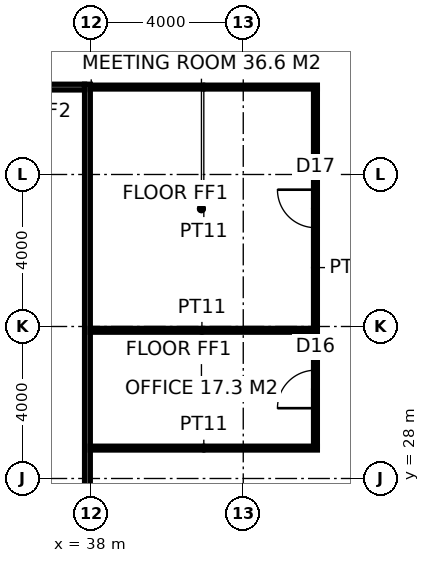
"""IFC4 building model, lengths in metres.
Left out: names, types, materials, properties, quantities, classifications, styles, units other than length and angle.
Written with IfcOpenShell. Run it as: python <this file> out.ifc"""

import sys

from ifc_helpers import new_model, si_unit, direction, frame, frame_2d, origin, place, context, subcontext, project, spatial, rectangle, extrude, element, fill, save


model = new_model("IFC4")
c1 = context("Model", 3, precision=1e-05, world=origin(), true_north=direction((0.0, 1.0)))
c2 = subcontext(c1, "Body", "Model", "MODEL_VIEW")
j1 = project(units=[si_unit("LENGTHUNIT", "METRE"), si_unit("PLANEANGLEUNIT", "RADIAN")], contexts=[c1])
p1 = place(None, origin())
s1 = spatial("IfcSite", under=j1, at=p1, CompositionType="ELEMENT")
p2 = place(p1, origin())
s2 = spatial("IfcBuilding", under=s1, at=p2, CompositionType="ELEMENT")
p3 = place(p2, frame((0.0, 0.0, 81.4)))
s3 = spatial("IfcBuildingStorey", under=s2, at=p3, CompositionType="ELEMENT", Elevation=81.4)
p4 = place(p3, frame((37.9, 15.025, 0.0), z_axis=(0.0, 0.0, 1.0), x_axis=(0.0, 1.0, 0.0)))
e1 = element("IfcWall", 1, at=p4, inside=s3, PredefinedType="PARTITIONING", context=c2, shape_type="SweptSolid", body=[
    extrude(rectangle(XDim=23.35, YDim=0.15, at=frame_2d((11.675, 0.0))), origin(), (0.0, 0.0, 1.0), 2.95),
])
p5 = place(p4, frame((10.775, 0.0, 0.0)))
e2 = element("IfcOpeningElement", 2, at=p5, cuts=e1, PredefinedType="OPENING", context=c2, shape_type="SweptSolid", body=[
    extrude(rectangle(XDim=1.8, YDim=2.4, at=frame_2d((0.9, 1.2))), frame((0.0, 0.085, 0.0), z_axis=(0.0, -1.0, 0.0), x_axis=(1.0, 0.0, 0.0)), (0.0, 0.0, 1.0), 0.17),
])
p6 = place(p3, frame((15.775, 38.3, 0.0), z_axis=(0.0, 0.0, 1.0), x_axis=(1.0, 0.0, 0.0)))
e3 = element("IfcWall", 3, at=p6, inside=s3, PredefinedType="PARTITIONING", context=c2, shape_type="SweptSolid", body=[
    extrude(rectangle(XDim=22.05, YDim=0.15, at=frame_2d((11.025, 0.0))), origin(), (0.0, 0.0, 1.0), 3.85),
])
p7 = place(p6, frame((7.975, 0.0, 0.0)))
e4 = element("IfcOpeningElement", 4, at=p7, cuts=e3, PredefinedType="OPENING", context=c2, shape_type="SweptSolid", body=[
    extrude(rectangle(XDim=0.9, YDim=2.1, at=frame_2d((0.45, 1.05))), frame((0.0, 0.085, 0.0), z_axis=(0.0, -1.0, 0.0), x_axis=(1.0, 0.0, 0.0)), (0.0, 0.0, 1.0), 0.17),
])
p8 = place(p6, frame((11.725, 0.0, 0.0)))
e5 = element("IfcOpeningElement", 5, at=p8, cuts=e3, PredefinedType="OPENING", context=c2, shape_type="SweptSolid", body=[
    extrude(rectangle(XDim=1.0, YDim=2.1, at=frame_2d((0.5, 1.05))), frame((0.0, 0.085, 0.0), z_axis=(0.0, -1.0, 0.0), x_axis=(1.0, 0.0, 0.0)), (0.0, 0.0, 1.0), 0.17),
])
p9 = place(p6, frame((15.575, 0.0, 0.0)))
e6 = element("IfcOpeningElement", 6, at=p9, cuts=e3, PredefinedType="OPENING", context=c2, shape_type="SweptSolid", body=[
    extrude(rectangle(XDim=0.9, YDim=2.1, at=frame_2d((0.45, 1.05))), frame((0.0, 0.085, 0.0), z_axis=(0.0, -1.0, 0.0), x_axis=(1.0, 0.0, 0.0)), (0.0, 0.0, 1.0), 0.17),
])
p10 = place(p3, frame((37.975, 28.8, 0.0), z_axis=(0.0, 0.0, 1.0), x_axis=(1.0, 0.0, 0.0)))
e7 = element("IfcWall", 7, at=p10, inside=s3, PredefinedType="PARTITIONING", context=c2, shape_type="SweptSolid", body=[
    extrude(rectangle(XDim=5.975, YDim=0.1, at=frame_2d((2.987, 0.0))), origin(), (0.0, 0.0, 1.0), 3.85),
])
p11 = place(p3, frame((37.975, 31.9, 0.0), z_axis=(0.0, 0.0, 1.0), x_axis=(1.0, 0.0, 0.0)))
e8 = element("IfcWall", 8, at=p11, inside=s3, PredefinedType="PARTITIONING", context=c2, shape_type="SweptSolid", body=[
    extrude(rectangle(XDim=5.875, YDim=0.1, at=frame_2d((2.938, 0.0))), origin(), (0.0, 0.0, 1.0), 2.95),
])
p12 = place(p3, frame((37.975, 38.3, 0.0), z_axis=(0.0, 0.0, 1.0), x_axis=(1.0, 0.0, 0.0)))
e9 = element("IfcWall", 9, at=p12, inside=s3, PredefinedType="PARTITIONING", context=c2, shape_type="SweptSolid", body=[
    extrude(rectangle(XDim=5.975, YDim=0.1, at=frame_2d((2.987, 0.0))), origin(), (0.0, 0.0, 1.0), 3.85),
])
p13 = place(p3, frame((43.9, 28.85, 0.0), z_axis=(0.0, 0.0, 1.0), x_axis=(0.0, 1.0, 0.0)))
e10 = element("IfcWall", 10, at=p13, inside=s3, PredefinedType="PARTITIONING", context=c2, shape_type="SweptSolid", body=[
    extrude(rectangle(XDim=9.4, YDim=0.1, at=frame_2d((4.7, 0.0))), origin(), (0.0, 0.0, 1.0), 3.85),
])
p14 = place(p13, frame((1.0, 0.0, 0.0)))
e11 = element("IfcOpeningElement", 11, at=p14, cuts=e10, PredefinedType="OPENING", context=c2, shape_type="SweptSolid", body=[
    extrude(rectangle(XDim=1.0, YDim=2.2, at=frame_2d((0.5, 1.1))), frame((0.0, 0.06, 0.0), z_axis=(0.0, -1.0, 0.0), x_axis=(1.0, 0.0, 0.0)), (0.0, 0.0, 1.0), 0.12),
])
p15 = place(p13, frame((5.75, 0.0, 0.0)))
e12 = element("IfcOpeningElement", 12, at=p15, cuts=e10, PredefinedType="OPENING", context=c2, shape_type="SweptSolid", body=[
    extrude(rectangle(XDim=1.0, YDim=2.2, at=frame_2d((0.5, 1.1))), frame((0.0, 0.06, 0.0), z_axis=(0.0, -1.0, 0.0), x_axis=(1.0, 0.0, 0.0)), (0.0, 0.0, 1.0), 0.12),
])
p16 = place(p14, origin())
e13 = element("IfcDoor", 13, at=p16, inside=s3, OperationType="SINGLE_SWING_LEFT", PredefinedType="DOOR", context=c2, shape_type="SweptSolid", body=[
    extrude(rectangle(XDim=1.0, YDim=2.2, at=frame_2d((0.5, 1.1))), frame((0.0, 0.025, 0.0), z_axis=(0.0, -1.0, 0.0), x_axis=(1.0, 0.0, 0.0)), (0.0, 0.0, 1.0), 0.05),
])
fill(e11, e13)
p17 = place(p15, origin())
e14 = element("IfcDoor", 14, at=p17, inside=s3, OperationType="SINGLE_SWING_RIGHT", PredefinedType="DOOR", context=c2, shape_type="SweptSolid", body=[
    extrude(rectangle(XDim=1.0, YDim=2.2, at=frame_2d((0.5, 1.1))), frame((0.0, 0.025, 0.0), z_axis=(0.0, -1.0, 0.0), x_axis=(1.0, 0.0, 0.0)), (0.0, 0.0, 1.0), 0.05),
])
fill(e12, e14)
save(model, sys.argv[1])
